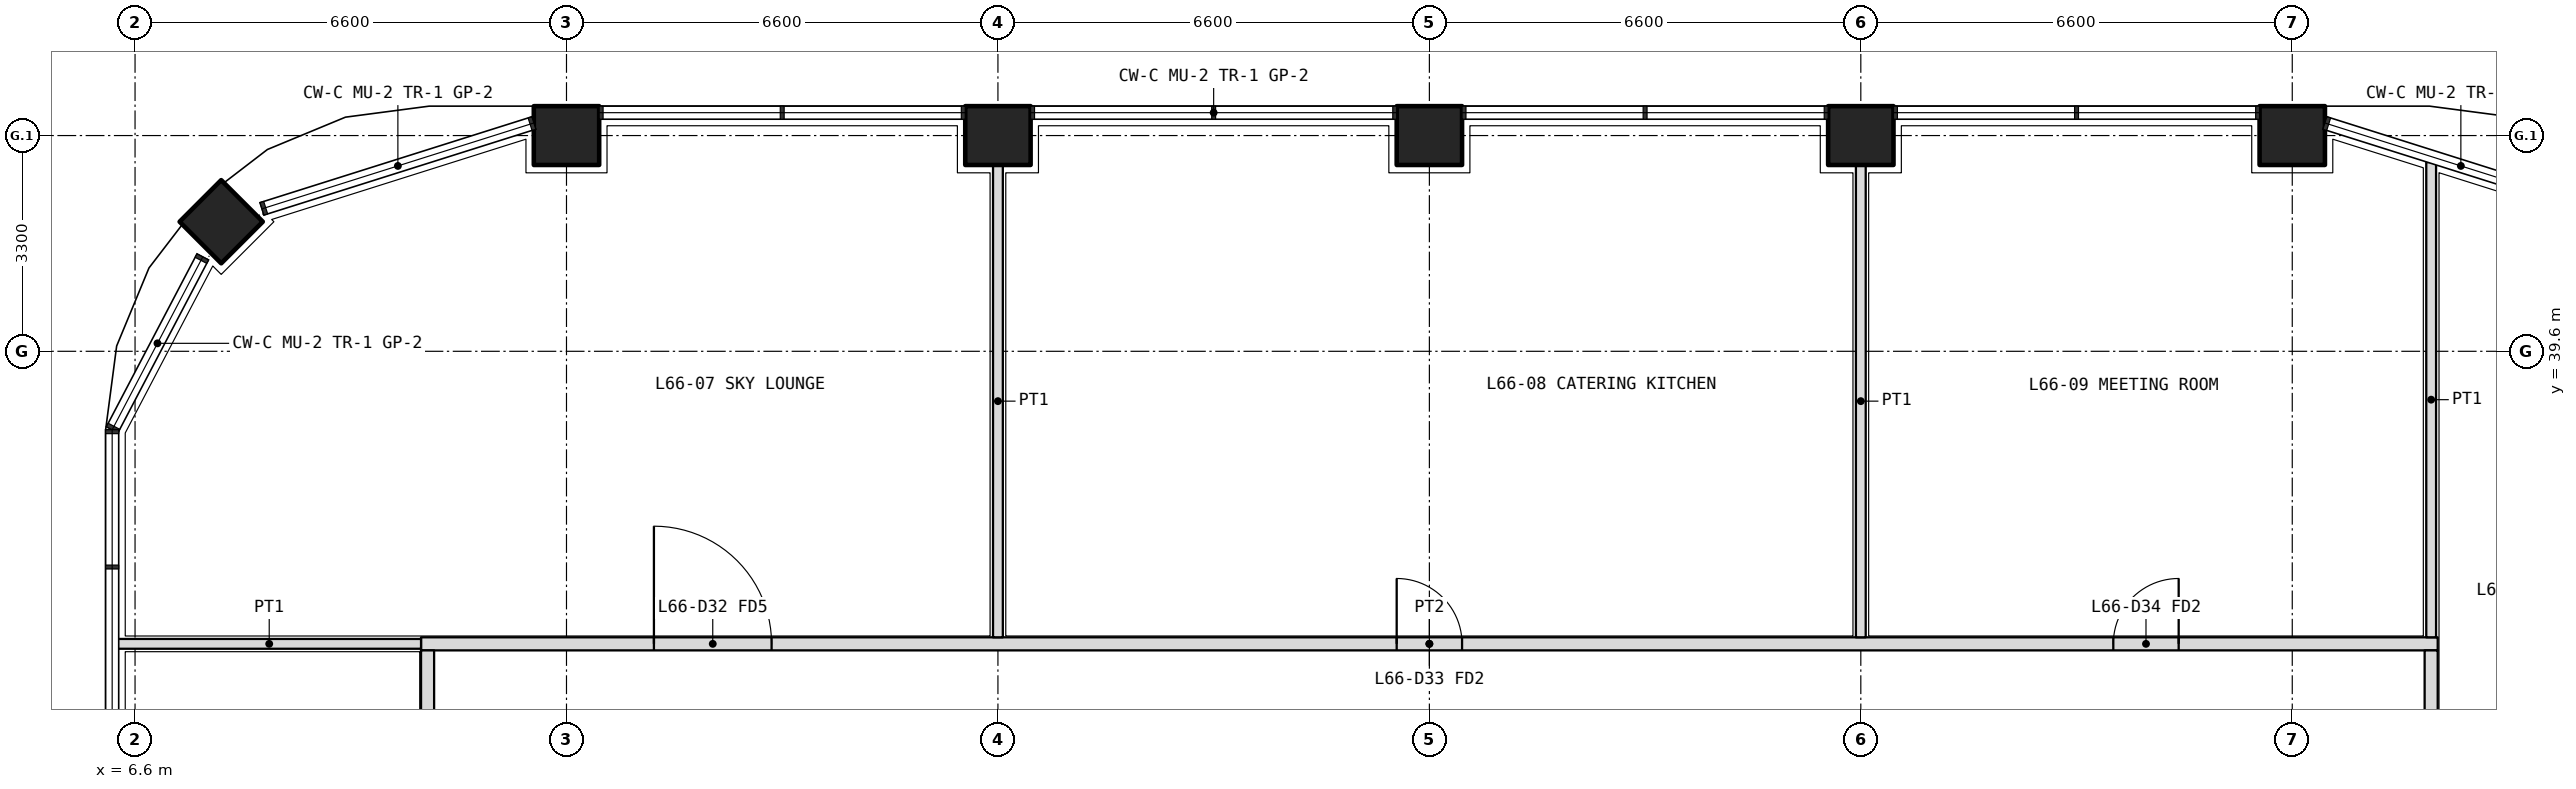
"""IFC4 building model, lengths in metres.
Left out: names, types, materials, properties, quantities, classifications, styles, units other than length and angle.
Written with IfcOpenShell. Run it as: python <this file> out.ifc"""

import sys

from ifc_helpers import new_model, si_unit, direction, frame, frame_2d, origin, origin_2d, place, context, subcontext, project, spatial, rectangle, extrude, element, fill, save


model = new_model("IFC4")
c1 = context("Model", 3, precision=1e-05, world=origin(), true_north=direction((0.0, 1.0)))
c2 = subcontext(c1, "Body", "Model", "MODEL_VIEW")
j1 = project(units=[si_unit("LENGTHUNIT", "METRE"), si_unit("PLANEANGLEUNIT", "RADIAN")], contexts=[c1])
p1 = place(None, origin())
s1 = spatial("IfcSite", under=j1, at=p1, CompositionType="ELEMENT")
p2 = place(p1, origin())
s2 = spatial("IfcBuilding", under=s1, at=p2, CompositionType="ELEMENT")
p3 = place(p2, frame((0.0, 0.0, 288.0)))
s3 = spatial("IfcBuildingStorey", under=s2, at=p3, CompositionType="ELEMENT", Elevation=288.0)
p4 = place(p3, frame((7.918, 41.582, 0.0), z_axis=(0.0, 0.0, 1.0), x_axis=(0.707106781187, 0.707106781187, 0.0)))
e1 = element("IfcColumn", 1, at=p4, inside=s3, PredefinedType="COLUMN", context=c2, shape_type="SweptSolid", body=[
    extrude(rectangle(XDim=0.9, YDim=0.9, at=origin_2d()), origin(), (0.0, 0.0, 1.0), 4.8),
])
for number, where, z_axis, x_axis in (
    (2, (13.2, 42.9, 0.0), (0.0, 0.0, 1.0), (1.0, 0.0, 0.0)),
    (3, (19.8, 42.9, 0.0), (0.0, 0.0, 1.0), (1.0, 0.0, 0.0)),
    (4, (26.4, 42.9, 0.0), (0.0, 0.0, 1.0), (1.0, 0.0, 0.0)),
    (5, (33.0, 42.9, 0.0), (0.0, 0.0, 1.0), (1.0, 0.0, 0.0)),
    (6, (39.6, 42.9, 0.0), (0.0, 0.0, 1.0), (1.0, 0.0, 0.0)),
):
    element("IfcColumn", number, at=place(p3, frame(where, z_axis=z_axis, x_axis=x_axis)), inside=s3, PredefinedType="COLUMN", context=c2, shape_type="SweptSolid", body=[
        extrude(rectangle(XDim=1.0, YDim=0.9, at=origin_2d()), origin(), (0.0, 0.0, 1.0), 4.8),
    ])
p5 = place(p3, frame((10.975, 35.125, 0.0), z_axis=(0.0, 0.0, 1.0), x_axis=(1.0, 0.0, 0.0)))
e7 = element("IfcWall", 7, at=p5, inside=s3, PredefinedType="PARTITIONING", context=c2, shape_type="SweptSolid", body=[
    extrude(rectangle(XDim=30.85, YDim=0.2, at=frame_2d((15.425, 0.0))), origin(), (0.0, 0.0, 1.0), 3.1),
])
p6 = place(p5, frame((3.562, 0.0, 0.0)))
e8 = element("IfcOpeningElement", 8, at=p6, cuts=e7, PredefinedType="OPENING", context=c2, shape_type="SweptSolid", body=[
    extrude(rectangle(XDim=1.8, YDim=2.1, at=frame_2d((0.9, 1.05))), frame((0.0, 0.11, 0.0), z_axis=(0.0, -1.0, 0.0), x_axis=(1.0, 0.0, 0.0)), (0.0, 0.0, 1.0), 0.22),
])
p7 = place(p5, frame((14.925, 0.0, 0.0)))
e9 = element("IfcOpeningElement", 9, at=p7, cuts=e7, PredefinedType="OPENING", context=c2, shape_type="SweptSolid", body=[
    extrude(rectangle(XDim=1.0, YDim=2.1, at=frame_2d((0.5, 1.05))), frame((0.0, 0.11, 0.0), z_axis=(0.0, -1.0, 0.0), x_axis=(1.0, 0.0, 0.0)), (0.0, 0.0, 1.0), 0.22),
])
p8 = place(p5, frame((25.887, 0.0, 0.0)))
e10 = element("IfcOpeningElement", 10, at=p8, cuts=e7, PredefinedType="OPENING", context=c2, shape_type="SweptSolid", body=[
    extrude(rectangle(XDim=1.0, YDim=2.1, at=frame_2d((0.5, 1.05))), frame((0.0, 0.11, 0.0), z_axis=(0.0, -1.0, 0.0), x_axis=(1.0, 0.0, 0.0)), (0.0, 0.0, 1.0), 0.22),
])
p9 = place(p3, frame((11.075, 11.175, 0.0), z_axis=(0.0, 0.0, 1.0), x_axis=(0.0, 1.0, 0.0)))
e11 = element("IfcWall", 11, at=p9, inside=s3, PredefinedType="PARTITIONING", context=c2, shape_type="SweptSolid", body=[
    extrude(rectangle(XDim=23.85, YDim=0.2, at=frame_2d((11.925, 0.0))), origin(), (0.0, 0.0, 1.0), 3.1),
])
p10 = place(p9, frame((3.762, 0.0, 0.0)))
e12 = element("IfcOpeningElement", 12, at=p10, cuts=e11, PredefinedType="OPENING", context=c2, shape_type="SweptSolid", body=[
    extrude(rectangle(XDim=1.0, YDim=2.1, at=frame_2d((0.5, 1.05))), frame((0.0, 0.11, 0.0), z_axis=(0.0, -1.0, 0.0), x_axis=(1.0, 0.0, 0.0)), (0.0, 0.0, 1.0), 0.22),
])
p11 = place(p9, frame((9.175, 0.0, 0.0)))
e13 = element("IfcOpeningElement", 13, at=p11, cuts=e11, PredefinedType="OPENING", context=c2, shape_type="SweptSolid", body=[
    extrude(rectangle(XDim=1.0, YDim=2.1, at=frame_2d((0.5, 1.05))), frame((0.0, 0.11, 0.0), z_axis=(0.0, -1.0, 0.0), x_axis=(1.0, 0.0, 0.0)), (0.0, 0.0, 1.0), 0.22),
])
p12 = place(p9, frame((12.275, 0.0, 0.0)))
e14 = element("IfcOpeningElement", 14, at=p12, cuts=e11, PredefinedType="OPENING", context=c2, shape_type="SweptSolid", body=[
    extrude(rectangle(XDim=0.9, YDim=2.1, at=frame_2d((0.45, 1.05))), frame((0.0, 0.11, 0.0), z_axis=(0.0, -1.0, 0.0), x_axis=(1.0, 0.0, 0.0)), (0.0, 0.0, 1.0), 0.22),
])
p13 = place(p9, frame((16.175, 0.0, 0.0)))
e15 = element("IfcOpeningElement", 15, at=p13, cuts=e11, PredefinedType="OPENING", context=c2, shape_type="SweptSolid", body=[
    extrude(rectangle(XDim=0.9, YDim=2.1, at=frame_2d((0.45, 1.05))), frame((0.0, 0.11, 0.0), z_axis=(0.0, -1.0, 0.0), x_axis=(1.0, 0.0, 0.0)), (0.0, 0.0, 1.0), 0.22),
])
p14 = place(p9, frame((20.738, 0.0, 0.0)))
e16 = element("IfcOpeningElement", 16, at=p14, cuts=e11, PredefinedType="OPENING", context=c2, shape_type="SweptSolid", body=[
    extrude(rectangle(XDim=1.0, YDim=2.1, at=frame_2d((0.5, 1.05))), frame((0.0, 0.11, 0.0), z_axis=(0.0, -1.0, 0.0), x_axis=(1.0, 0.0, 0.0)), (0.0, 0.0, 1.0), 0.22),
])
p15 = place(p3, frame((41.725, 11.175, 0.0), z_axis=(0.0, 0.0, 1.0), x_axis=(0.0, 1.0, 0.0)))
e17 = element("IfcWall", 17, at=p15, inside=s3, PredefinedType="PARTITIONING", context=c2, shape_type="SweptSolid", body=[
    extrude(rectangle(XDim=23.85, YDim=0.2, at=frame_2d((11.925, 0.0))), origin(), (0.0, 0.0, 1.0), 3.1),
])
p16 = place(p15, frame((0.9, 0.0, 0.0)))
e18 = element("IfcOpeningElement", 18, at=p16, cuts=e17, PredefinedType="OPENING", context=c2, shape_type="SweptSolid", body=[
    extrude(rectangle(XDim=1.0, YDim=2.1, at=frame_2d((0.5, 1.05))), frame((0.0, 0.11, 0.0), z_axis=(0.0, -1.0, 0.0), x_axis=(1.0, 0.0, 0.0)), (0.0, 0.0, 1.0), 0.22),
])
p17 = place(p15, frame((4.25, 0.0, 0.0)))
e19 = element("IfcOpeningElement", 19, at=p17, cuts=e17, PredefinedType="OPENING", context=c2, shape_type="SweptSolid", body=[
    extrude(rectangle(XDim=0.9, YDim=2.1, at=frame_2d((0.45, 1.05))), frame((0.0, 0.11, 0.0), z_axis=(0.0, -1.0, 0.0), x_axis=(1.0, 0.0, 0.0)), (0.0, 0.0, 1.0), 0.22),
])
p18 = place(p15, frame((10.363, 0.0, 0.0)))
e20 = element("IfcOpeningElement", 20, at=p18, cuts=e17, PredefinedType="OPENING", context=c2, shape_type="SweptSolid", body=[
    extrude(rectangle(XDim=1.0, YDim=2.1, at=frame_2d((0.5, 1.05))), frame((0.0, 0.11, 0.0), z_axis=(0.0, -1.0, 0.0), x_axis=(1.0, 0.0, 0.0)), (0.0, 0.0, 1.0), 0.22),
])
p19 = place(p15, frame((19.087, 0.0, 0.0)))
e21 = element("IfcOpeningElement", 21, at=p19, cuts=e17, PredefinedType="OPENING", context=c2, shape_type="SweptSolid", body=[
    extrude(rectangle(XDim=1.0, YDim=2.1, at=frame_2d((0.5, 1.05))), frame((0.0, 0.11, 0.0), z_axis=(0.0, -1.0, 0.0), x_axis=(1.0, 0.0, 0.0)), (0.0, 0.0, 1.0), 0.22),
])
p20 = place(p3, frame((41.725, 42.495, 0.0), z_axis=(0.0, 0.0, 1.0), x_axis=(0.0, -1.0, 0.0)))
e22 = element("IfcWall", 22, at=p20, inside=s3, PredefinedType="PARTITIONING", context=c2, shape_type="SweptSolid", body=[
    extrude(rectangle(XDim=7.27, YDim=0.15, at=frame_2d((3.635, 0.0))), origin(), (0.0, 0.0, 1.0), 3.1),
])
p21 = place(p3, frame((6.33, 35.125, 0.0), z_axis=(0.0, 0.0, 1.0), x_axis=(1.0, 0.0, 0.0)))
e23 = element("IfcWall", 23, at=p21, inside=s3, PredefinedType="PARTITIONING", context=c2, shape_type="SweptSolid", body=[
    extrude(rectangle(XDim=4.645, YDim=0.15, at=frame_2d((2.323, 0.0))), origin(), (0.0, 0.0, 1.0), 3.1),
])
for number, where, z_axis, x_axis in (
    (24, (19.8, 42.45, 0.0), (0.0, 0.0, 1.0), (0.0, -1.0, 0.0)),
    (25, (33.0, 42.45, 0.0), (0.0, 0.0, 1.0), (0.0, -1.0, 0.0)),
):
    element("IfcWall", number, at=place(p3, frame(where, z_axis=z_axis, x_axis=x_axis)), inside=s3, PredefinedType="PARTITIONING", context=c2, shape_type="SweptSolid", body=[
        extrude(rectangle(XDim=7.225, YDim=0.15, at=frame_2d((3.612, 0.0))), origin(), (0.0, 0.0, 1.0), 3.1),
    ])
p22 = place(p6, origin())
e26 = element("IfcDoor", 26, at=p22, inside=s3, OperationType="DOUBLE_DOOR_DOUBLE_SWING", PredefinedType="DOOR", context=c2, shape_type="SweptSolid", body=[
    extrude(rectangle(XDim=1.8, YDim=2.1, at=frame_2d((0.9, 1.05))), frame((0.0, 0.025, 0.0), z_axis=(0.0, -1.0, 0.0), x_axis=(1.0, 0.0, 0.0)), (0.0, 0.0, 1.0), 0.05),
])
fill(e8, e26)
p23 = place(p7, origin())
e27 = element("IfcDoor", 27, at=p23, inside=s3, OperationType="SINGLE_SWING_LEFT", PredefinedType="DOOR", context=c2, shape_type="SweptSolid", body=[
    extrude(rectangle(XDim=1.0, YDim=2.1, at=frame_2d((0.5, 1.05))), frame((0.0, 0.025, 0.0), z_axis=(0.0, -1.0, 0.0), x_axis=(1.0, 0.0, 0.0)), (0.0, 0.0, 1.0), 0.05),
])
fill(e9, e27)
p24 = place(p8, origin())
e28 = element("IfcDoor", 28, at=p24, inside=s3, OperationType="SINGLE_SWING_RIGHT", PredefinedType="DOOR", context=c2, shape_type="SweptSolid", body=[
    extrude(rectangle(XDim=1.0, YDim=2.1, at=frame_2d((0.5, 1.05))), frame((0.0, 0.025, 0.0), z_axis=(0.0, -1.0, 0.0), x_axis=(1.0, 0.0, 0.0)), (0.0, 0.0, 1.0), 0.05),
])
fill(e10, e28)
save(model, sys.argv[1])
